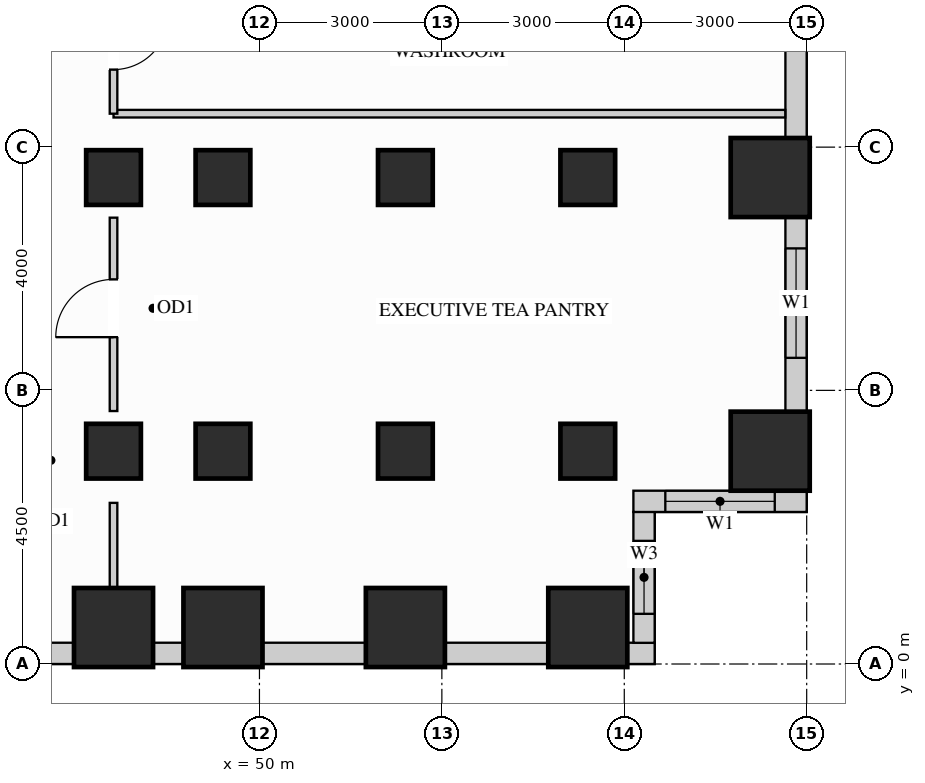
"""IFC4 building model, lengths in metres.
Left out: names, types, materials, properties, quantities, classifications, styles, units other than length and angle.
Written with IfcOpenShell. Run it as: python <this file> out.ifc"""

import sys

from ifc_helpers import new_model, si_unit, direction, frame, frame_2d, origin, origin_2d, place, context, subcontext, project, spatial, rectangle, extrude, source, transform, mapped, element, fill, save


model = new_model("IFC4")
c1 = context("Model", 3, precision=1e-05, world=origin(), true_north=direction((0.0, 1.0)))
c2 = subcontext(c1, "Body", "Model", "MODEL_VIEW")
j1 = project(units=[si_unit("LENGTHUNIT", "METRE"), si_unit("PLANEANGLEUNIT", "RADIAN")], contexts=[c1])
p1 = place(None, origin())
s1 = spatial("IfcSite", under=j1, at=p1, CompositionType="ELEMENT")
p2 = place(p1, origin())
s2 = spatial("IfcBuilding", under=s1, at=p2, CompositionType="ELEMENT")
p3 = place(p2, frame((0.0, 0.0, 51.3)))
s3 = spatial("IfcBuildingStorey", under=s2, at=p3, CompositionType="ELEMENT", Elevation=51.3)
m1 = source(origin(), c2, "Body", "SweptSolid", [
    extrude(rectangle(XDim=0.9, YDim=0.9, at=origin_2d()), origin(), (0.0, 0.0, 1.0), 3.38),
])
for number, where, z_axis, x_axis in (
    (1, (47.6, 3.5, 0.0), (0.0, 0.0, 1.0), (1.0, 0.0, 0.0)),
    (2, (47.6, 8.0, 0.0), (0.0, 0.0, 1.0), (1.0, 0.0, 0.0)),
    (3, (49.4, 3.5, 0.0), (0.0, 0.0, 1.0), (1.0, 0.0, 0.0)),
    (4, (49.4, 8.0, 0.0), (0.0, 0.0, 1.0), (1.0, 0.0, 0.0)),
    (5, (52.4, 3.5, 0.0), (0.0, 0.0, 1.0), (1.0, 0.0, 0.0)),
    (6, (52.4, 8.0, 0.0), (0.0, 0.0, 1.0), (1.0, 0.0, 0.0)),
    (7, (55.4, 3.5, 0.0), (0.0, 0.0, 1.0), (1.0, 0.0, 0.0)),
    (8, (55.4, 8.0, 0.0), (0.0, 0.0, 1.0), (1.0, 0.0, 0.0)),
):
    element("IfcColumn", number, at=place(p3, frame(where, z_axis=z_axis, x_axis=x_axis)), inside=s3, PredefinedType="COLUMN", context=c2, shape_type="MappedRepresentation", body=[
        mapped(m1, transform((0.0, 0.0, 0.0), x_axis=(1.0, 0.0, 0.0), y_axis=(0.0, 1.0, 0.0), z_axis=(0.0, 0.0, 1.0))),
    ])
m2 = source(origin(), c2, "Body", "SweptSolid", [
    extrude(rectangle(XDim=1.3, YDim=1.3, at=origin_2d()), origin(), (0.0, 0.0, 1.0), 3.38),
])
for number, where, z_axis, x_axis in (
    (9, (58.4, 3.5, 0.0), (0.0, 0.0, 1.0), (1.0, 0.0, 0.0)),
    (10, (58.4, 8.0, 0.0), (0.0, 0.0, 1.0), (1.0, 0.0, 0.0)),
    (11, (47.6, 0.6, 0.0), (0.0, 0.0, 1.0), (1.0, 0.0, 0.0)),
    (12, (49.4, 0.6, 0.0), (0.0, 0.0, 1.0), (1.0, 0.0, 0.0)),
    (13, (52.4, 0.6, 0.0), (0.0, 0.0, 1.0), (1.0, 0.0, 0.0)),
    (14, (55.4, 0.6, 0.0), (0.0, 0.0, 1.0), (1.0, 0.0, 0.0)),
):
    element("IfcColumn", number, at=place(p3, frame(where, z_axis=z_axis, x_axis=x_axis)), inside=s3, PredefinedType="COLUMN", context=c2, shape_type="MappedRepresentation", body=[
        mapped(m2, transform((0.0, 0.0, 0.0), x_axis=(1.0, 0.0, 0.0), y_axis=(0.0, 1.0, 0.0), z_axis=(0.0, 0.0, 1.0))),
    ])
p4 = place(p3, frame((40.648, 0.175, 0.0), z_axis=(0.0, 0.0, 1.0), x_axis=(1.0, 0.0, 0.0)))
e15 = element("IfcWall", 15, at=p4, inside=s3, PredefinedType="SOLIDWALL", context=c2, shape_type="SweptSolid", body=[
    extrude(rectangle(XDim=6.304, YDim=0.35, at=frame_2d((3.152, 0.0))), origin(), (0.0, 0.0, 1.0), 2.51),
])
p5 = place(p4, frame((0.687, 0.0, 0.78)))
e16 = element("IfcOpeningElement", 16, at=p5, cuts=e15, PredefinedType="OPENING", context=c2, shape_type="SweptSolid", body=[
    extrude(rectangle(XDim=1.8, YDim=1.55, at=frame_2d((0.9, 0.775))), frame((0.0, 0.185, 0.0), z_axis=(0.0, -1.0, 0.0), x_axis=(1.0, 0.0, 0.0)), (0.0, 0.0, 1.0), 0.37),
])
p6 = place(p4, frame((2.855, 0.0, 0.78)))
e17 = element("IfcOpeningElement", 17, at=p6, cuts=e15, PredefinedType="OPENING", context=c2, shape_type="SweptSolid", body=[
    extrude(rectangle(XDim=1.8, YDim=1.55, at=frame_2d((0.9, 0.775))), frame((0.0, 0.185, 0.0), z_axis=(0.0, -1.0, 0.0), x_axis=(1.0, 0.0, 0.0)), (0.0, 0.0, 1.0), 0.37),
])
m3 = source(origin(), c2, "Body", "SweptSolid", [
    extrude(rectangle(XDim=0.504, YDim=0.35, at=frame_2d((0.252, 0.0))), origin(), (0.0, 0.0, 1.0), 3.365),
])
p7 = place(p3, frame((48.248, 0.175, 0.0), z_axis=(0.0, 0.0, 1.0), x_axis=(1.0, 0.0, 0.0)))
e18 = element("IfcWall", 18, at=p7, inside=s3, PredefinedType="SOLIDWALL", context=c2, shape_type="MappedRepresentation", body=[
    mapped(m3, transform((0.0, 0.0, 0.0), x_axis=(1.0, 0.0, 0.0), y_axis=(0.0, 1.0, 0.0), z_axis=(0.0, 0.0, 1.0))),
])
m4 = source(origin(), c2, "Body", "SweptSolid", [
    extrude(rectangle(XDim=1.704, YDim=0.35, at=frame_2d((0.852, 0.0))), origin(), (0.0, 0.0, 1.0), 2.51),
])
for number, where, z_axis, x_axis in (
    (19, (50.048, 0.175, 0.0), (0.0, 0.0, 1.0), (1.0, 0.0, 0.0)),
    (20, (53.048, 0.175, 0.0), (0.0, 0.0, 1.0), (1.0, 0.0, 0.0)),
):
    element("IfcWall", number, at=place(p3, frame(where, z_axis=z_axis, x_axis=x_axis)), inside=s3, PredefinedType="SOLIDWALL", context=c2, shape_type="MappedRepresentation", body=[
        mapped(m4, transform((0.0, 0.0, 0.0), x_axis=(1.0, 0.0, 0.0), y_axis=(0.0, 1.0, 0.0), z_axis=(0.0, 0.0, 1.0))),
    ])
m5 = source(origin(), c2, "Body", "SweptSolid", [
    extrude(rectangle(XDim=0.452, YDim=0.35, at=frame_2d((0.226, 0.0))), origin(), (0.0, 0.0, 1.0), 3.365),
])
p8 = place(p3, frame((56.048, 0.175, 0.0), z_axis=(0.0, 0.0, 1.0), x_axis=(1.0, 0.0, 0.0)))
e21 = element("IfcWall", 21, at=p8, inside=s3, PredefinedType="SOLIDWALL", context=c2, shape_type="MappedRepresentation", body=[
    mapped(m5, transform((0.0, 0.0, 0.0), x_axis=(1.0, 0.0, 0.0), y_axis=(0.0, 1.0, 0.0), z_axis=(0.0, 0.0, 1.0))),
])
p9 = place(p3, frame((56.325, 0.348, 0.0), z_axis=(0.0, 0.0, 1.0), x_axis=(0.0, 1.0, 0.0)))
e22 = element("IfcWall", 22, at=p9, inside=s3, PredefinedType="SOLIDWALL", context=c2, shape_type="SweptSolid", body=[
    extrude(rectangle(XDim=2.154, YDim=0.35, at=frame_2d((1.077, 0.0))), origin(), (0.0, 0.0, 1.0), 3.365),
])
p10 = place(p9, frame((0.477, 0.0, 0.78)))
e23 = element("IfcOpeningElement", 23, at=p10, cuts=e22, PredefinedType="OPENING", context=c2, shape_type="SweptSolid", body=[
    extrude(rectangle(XDim=1.2, YDim=2.1, at=frame_2d((0.6, 1.05))), frame((0.0, 0.185, 0.0), z_axis=(0.0, -1.0, 0.0), x_axis=(1.0, 0.0, 0.0)), (0.0, 0.0, 1.0), 0.37),
])
p11 = place(p3, frame((56.15, 2.675, 0.0), z_axis=(0.0, 0.0, 1.0), x_axis=(1.0, 0.0, 0.0)))
e24 = element("IfcWall", 24, at=p11, inside=s3, PredefinedType="SOLIDWALL", context=c2, shape_type="SweptSolid", body=[
    extrude(rectangle(XDim=2.85, YDim=0.35, at=frame_2d((1.425, 0.0))), origin(), (0.0, 0.0, 1.0), 3.365),
])
p12 = place(p11, frame((0.525, 0.0, 0.78)))
e25 = element("IfcOpeningElement", 25, at=p12, cuts=e24, PredefinedType="OPENING", context=c2, shape_type="SweptSolid", body=[
    extrude(rectangle(XDim=1.8, YDim=2.1, at=frame_2d((0.9, 1.05))), frame((0.0, 0.185, 0.0), z_axis=(0.0, -1.0, 0.0), x_axis=(1.0, 0.0, 0.0)), (0.0, 0.0, 1.0), 0.37),
])
p13 = place(p3, frame((58.825, 4.148, 0.0), z_axis=(0.0, 0.0, 1.0), x_axis=(0.0, 1.0, 0.0)))
e26 = element("IfcWall", 26, at=p13, inside=s3, PredefinedType="SOLIDWALL", context=c2, shape_type="SweptSolid", body=[
    extrude(rectangle(XDim=3.204, YDim=0.35, at=frame_2d((1.602, 0.0))), origin(), (0.0, 0.0, 1.0), 2.51),
])
p14 = place(p13, frame((0.887, 0.0, 0.78)))
e27 = element("IfcOpeningElement", 27, at=p14, cuts=e26, PredefinedType="OPENING", context=c2, shape_type="SweptSolid", body=[
    extrude(rectangle(XDim=1.8, YDim=1.55, at=frame_2d((0.9, 0.775))), frame((0.0, 0.185, 0.0), z_axis=(0.0, -1.0, 0.0), x_axis=(1.0, 0.0, 0.0)), (0.0, 0.0, 1.0), 0.37),
])
m6 = source(origin(), c2, "Body", "SweptSolid", [
    extrude(rectangle(XDim=4.204, YDim=0.35, at=frame_2d((2.102, 0.0))), origin(), (0.0, 0.0, 1.0), 2.51),
])
p15 = place(p3, frame((58.825, 8.648, 0.0), z_axis=(0.0, 0.0, 1.0), x_axis=(0.0, 1.0, 0.0)))
e28 = element("IfcWall", 28, at=p15, inside=s3, PredefinedType="SOLIDWALL", context=c2, shape_type="MappedRepresentation", body=[
    mapped(m6, transform((0.0, 0.0, 0.0), x_axis=(1.0, 0.0, 0.0), y_axis=(0.0, 1.0, 0.0), z_axis=(0.0, 0.0, 1.0))),
])
m7 = source(origin(), c2, "Body", "SweptSolid", [
    extrude(rectangle(XDim=11.048, YDim=0.125, at=frame_2d((5.524, 0.0))), origin(), (0.0, 0.0, 1.0), 3.365),
])
p16 = place(p3, frame((47.6, 9.05, 0.0), z_axis=(0.0, 0.0, 1.0), x_axis=(1.0, 0.0, 0.0)))
e29 = element("IfcWall", 29, at=p16, inside=s3, PredefinedType="PARTITIONING", context=c2, shape_type="MappedRepresentation", body=[
    mapped(m7, transform((0.0, 0.0, 0.0), x_axis=(1.0, 0.0, 0.0), y_axis=(0.0, 1.0, 0.0), z_axis=(0.0, 0.0, 1.0))),
])
p17 = place(p3, frame((47.6, 4.16, 0.0), z_axis=(0.0, 0.0, 1.0), x_axis=(0.0, 1.0, 0.0)))
e30 = element("IfcWall", 30, at=p17, inside=s3, PredefinedType="PARTITIONING", context=c2, shape_type="SweptSolid", body=[
    extrude(rectangle(XDim=3.18, YDim=0.125, at=frame_2d((1.59, 0.0))), origin(), (0.0, 0.0, 1.0), 2.67),
])
p18 = place(p17, frame((1.215, 0.0, 0.0)))
e31 = element("IfcOpeningElement", 31, at=p18, cuts=e30, PredefinedType="OPENING", context=c2, shape_type="SweptSolid", body=[
    extrude(rectangle(XDim=0.95, YDim=2.15, at=frame_2d((0.475, 1.075))), frame((0.0, 0.073, 0.0), z_axis=(0.0, -1.0, 0.0), x_axis=(1.0, 0.0, 0.0)), (0.0, 0.0, 1.0), 0.145),
])
m8 = source(origin(), c2, "Body", "SweptSolid", [
    extrude(rectangle(XDim=1.39, YDim=0.125, at=frame_2d((0.695, 0.0))), origin(), (0.0, 0.0, 1.0), 2.67),
])
p19 = place(p3, frame((47.6, 1.26, 0.0), z_axis=(0.0, 0.0, 1.0), x_axis=(0.0, 1.0, 0.0)))
e32 = element("IfcWall", 32, at=p19, inside=s3, PredefinedType="PARTITIONING", context=c2, shape_type="MappedRepresentation", body=[
    mapped(m8, transform((0.0, 0.0, 0.0), x_axis=(1.0, 0.0, 0.0), y_axis=(0.0, 1.0, 0.0), z_axis=(0.0, 0.0, 1.0))),
])
p20 = place(p3, frame((47.6, 9.05, 0.0), z_axis=(0.0, 0.0, 1.0), x_axis=(0.0, 1.0, 0.0)))
e33 = element("IfcWall", 33, at=p20, inside=s3, PredefinedType="PARTITIONING", context=c2, shape_type="SweptSolid", body=[
    extrude(rectangle(XDim=2.4, YDim=0.125, at=frame_2d((1.2, 0.0))), origin(), (0.0, 0.0, 1.0), 2.67),
])
p21 = place(p20, frame((0.725, 0.0, 0.0)))
e34 = element("IfcOpeningElement", 34, at=p21, cuts=e33, PredefinedType="OPENING", context=c2, shape_type="SweptSolid", body=[
    extrude(rectangle(XDim=0.9, YDim=2.15, at=frame_2d((0.45, 1.075))), frame((0.0, 0.073, 0.0), z_axis=(0.0, -1.0, 0.0), x_axis=(1.0, 0.0, 0.0)), (0.0, 0.0, 1.0), 0.145),
])
m9 = source(origin(), c2, "Body", "SweptSolid", [
    extrude(rectangle(XDim=0.95, YDim=2.15, at=frame_2d((0.475, 1.075))), frame((0.0, 0.025, 0.0), z_axis=(0.0, -1.0, 0.0), x_axis=(1.0, 0.0, 0.0)), (0.0, 0.0, 1.0), 0.05),
])
p22 = place(p18, origin())
e35 = element("IfcDoor", 35, at=p22, inside=s3, OperationType="SINGLE_SWING_LEFT", PredefinedType="DOOR", context=c2, shape_type="MappedRepresentation", body=[
    mapped(m9, transform((0.0, 0.0, 0.0), x_axis=(1.0, 0.0, 0.0), y_axis=(0.0, 1.0, 0.0), z_axis=(0.0, 0.0, 1.0))),
])
fill(e31, e35)
m10 = source(origin(), c2, "Body", "SweptSolid", [
    extrude(rectangle(XDim=0.9, YDim=2.15, at=frame_2d((0.45, 1.075))), frame((0.0, 0.025, 0.0), z_axis=(0.0, -1.0, 0.0), x_axis=(1.0, 0.0, 0.0)), (0.0, 0.0, 1.0), 0.05),
])
p23 = place(p21, origin())
e36 = element("IfcDoor", 36, at=p23, inside=s3, OperationType="SINGLE_SWING_RIGHT", PredefinedType="DOOR", context=c2, shape_type="MappedRepresentation", body=[
    mapped(m10, transform((0.0, 0.0, 0.0), x_axis=(1.0, 0.0, 0.0), y_axis=(0.0, 1.0, 0.0), z_axis=(0.0, 0.0, 1.0))),
])
fill(e34, e36)
m11 = source(origin(), c2, "Body", "SweptSolid", [
    extrude(rectangle(XDim=1.8, YDim=2.1, at=frame_2d((0.9, 1.05))), frame((0.0, 0.03, 0.0), z_axis=(0.0, -1.0, 0.0), x_axis=(1.0, 0.0, 0.0)), (0.0, 0.0, 1.0), 0.06),
])
p24 = place(p12, origin())
e37 = element("IfcWindow", 37, at=p24, inside=s3, PartitioningType="SINGLE_PANEL", PredefinedType="WINDOW", context=c2, shape_type="MappedRepresentation", body=[
    mapped(m11, transform((0.0, 0.0, 0.0), x_axis=(1.0, 0.0, 0.0), y_axis=(0.0, 1.0, 0.0), z_axis=(0.0, 0.0, 1.0))),
])
fill(e25, e37)
m12 = source(origin(), c2, "Body", "SweptSolid", [
    extrude(rectangle(XDim=1.8, YDim=1.55, at=frame_2d((0.9, 0.775))), frame((0.0, 0.03, 0.0), z_axis=(0.0, -1.0, 0.0), x_axis=(1.0, 0.0, 0.0)), (0.0, 0.0, 1.0), 0.06),
])
p25 = place(p14, origin())
e38 = element("IfcWindow", 38, at=p25, inside=s3, PartitioningType="SINGLE_PANEL", PredefinedType="WINDOW", context=c2, shape_type="MappedRepresentation", body=[
    mapped(m12, transform((0.0, 0.0, 0.0), x_axis=(1.0, 0.0, 0.0), y_axis=(0.0, 1.0, 0.0), z_axis=(0.0, 0.0, 1.0))),
])
fill(e27, e38)
m13 = source(origin(), c2, "Body", "SweptSolid", [
    extrude(rectangle(XDim=1.2, YDim=2.1, at=frame_2d((0.6, 1.05))), frame((0.0, 0.03, 0.0), z_axis=(0.0, -1.0, 0.0), x_axis=(1.0, 0.0, 0.0)), (0.0, 0.0, 1.0), 0.06),
])
p26 = place(p10, origin())
e39 = element("IfcWindow", 39, at=p26, inside=s3, PartitioningType="SINGLE_PANEL", PredefinedType="WINDOW", context=c2, shape_type="MappedRepresentation", body=[
    mapped(m13, transform((0.0, 0.0, 0.0), x_axis=(1.0, 0.0, 0.0), y_axis=(0.0, 1.0, 0.0), z_axis=(0.0, 0.0, 1.0))),
])
fill(e23, e39)
save(model, sys.argv[1])
